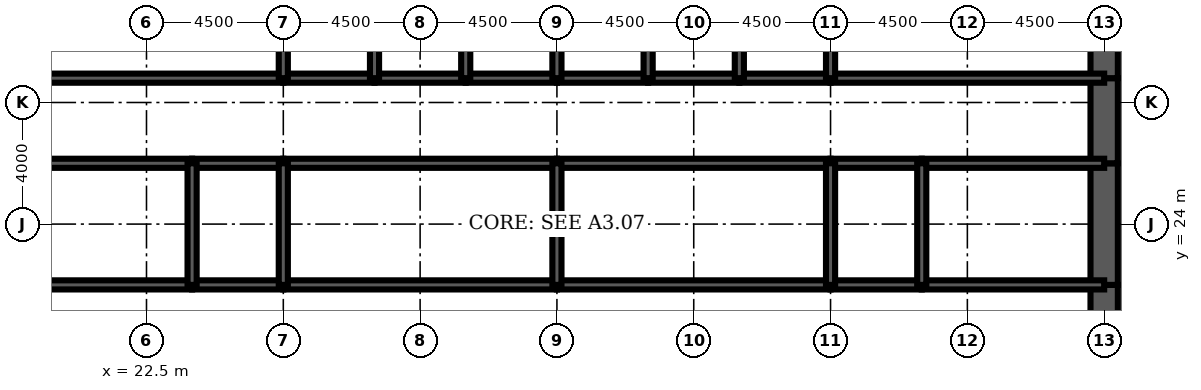
"""IFC4 building model, lengths in metres.
Left out: names, types, materials, properties, quantities, classifications, styles, units other than length and angle.
Written with IfcOpenShell. Run it as: python <this file> out.ifc"""

import sys

from ifc_helpers import new_model, si_unit, direction, frame, frame_2d, origin, place, context, subcontext, project, spatial, rectangle, extrude, element, fill, save


model = new_model("IFC4")
c1 = context("Model", 3, precision=1e-05, world=origin(), true_north=direction((0.0, 1.0)))
c2 = subcontext(c1, "Body", "Model", "MODEL_VIEW")
j1 = project(units=[si_unit("LENGTHUNIT", "METRE"), si_unit("PLANEANGLEUNIT", "RADIAN")], contexts=[c1])
p1 = place(None, origin())
s1 = spatial("IfcSite", under=j1, at=p1, CompositionType="ELEMENT")
p2 = place(p1, origin())
s2 = spatial("IfcBuilding", under=s1, at=p2, CompositionType="ELEMENT")
p3 = place(p2, frame((0.0, 0.0, 27.5)))
s3 = spatial("IfcBuildingStorey", under=s2, at=p3, CompositionType="ELEMENT", Elevation=27.5)
p4 = place(p3, frame((54.0, 19.2, 0.0), z_axis=(0.0, 0.0, 1.0), x_axis=(0.0, 1.0, 0.0)))
e1 = element("IfcWall", 1, at=p4, inside=s3, PredefinedType="SHEAR", context=c2, shape_type="SweptSolid", body=[
    extrude(rectangle(XDim=2.8, YDim=0.9, at=frame_2d((1.4, 0.0))), origin(), (0.0, 0.0, 1.0), 4.5),
])
p5 = place(p4, frame((0.4, 0.0, 0.0)))
e2 = element("IfcOpeningElement", 2, at=p5, cuts=e1, PredefinedType="OPENING", context=c2, shape_type="SweptSolid", body=[
    extrude(rectangle(XDim=1.8, YDim=2.1, at=frame_2d((0.9, 1.05))), frame((0.0, 0.46, 0.0), z_axis=(0.0, -1.0, 0.0), x_axis=(1.0, 0.0, 0.0)), (0.0, 0.0, 1.0), 0.92),
])
p6 = place(p3, frame((54.0, 22.0, 0.0), z_axis=(0.0, 0.0, 1.0), x_axis=(0.0, 1.0, 0.0)))
e3 = element("IfcWall", 3, at=p6, inside=s3, PredefinedType="SHEAR", context=c2, shape_type="SweptSolid", body=[
    extrude(rectangle(XDim=4.0, YDim=0.9, at=frame_2d((2.0, 0.0))), origin(), (0.0, 0.0, 1.0), 4.5),
])
p7 = place(p3, frame((54.0, 26.0, 0.0), z_axis=(0.0, 0.0, 1.0), x_axis=(0.0, 1.0, 0.0)))
e4 = element("IfcWall", 4, at=p7, inside=s3, PredefinedType="SHEAR", context=c2, shape_type="SweptSolid", body=[
    extrude(rectangle(XDim=2.8, YDim=0.9, at=frame_2d((1.4, 0.0))), origin(), (0.0, 0.0, 1.0), 4.5),
])
p8 = place(p7, frame((0.6, 0.0, 0.0)))
e5 = element("IfcOpeningElement", 5, at=p8, cuts=e4, PredefinedType="OPENING", context=c2, shape_type="SweptSolid", body=[
    extrude(rectangle(XDim=1.8, YDim=2.1, at=frame_2d((0.9, 1.05))), frame((0.0, 0.46, 0.0), z_axis=(0.0, -1.0, 0.0), x_axis=(1.0, 0.0, 0.0)), (0.0, 0.0, 1.0), 0.92),
])
p9 = place(p3, frame((54.0, 28.8, 0.0), z_axis=(0.0, 0.0, 1.0), x_axis=(0.0, 1.0, 0.0)))
e6 = element("IfcWall", 6, at=p9, inside=s3, PredefinedType="SHEAR", context=c2, shape_type="SweptSolid", body=[
    extrude(rectangle(XDim=3.2, YDim=0.9, at=frame_2d((1.6, 0.0))), origin(), (0.0, 0.0, 1.0), 4.5),
])
p10 = place(p3, frame((18.0, 28.8, 0.0), z_axis=(0.0, 0.0, 1.0), x_axis=(1.0, 0.0, 0.0)))
e7 = element("IfcWall", 7, at=p10, inside=s3, PredefinedType="SOLIDWALL", context=c2, shape_type="SweptSolid", body=[
    extrude(rectangle(XDim=9.0, YDim=0.3, at=frame_2d((4.5, 0.0))), origin(), (0.0, 0.0, 1.0), 4.5),
])
p11 = place(p10, frame((0.65, 0.0, 0.0)))
e8 = element("IfcOpeningElement", 8, at=p11, cuts=e7, PredefinedType="OPENING", context=c2, shape_type="SweptSolid", body=[
    extrude(rectangle(XDim=1.0, YDim=2.1, at=frame_2d((0.5, 1.05))), frame((0.0, 0.16, 0.0), z_axis=(0.0, -1.0, 0.0), x_axis=(1.0, 0.0, 0.0)), (0.0, 0.0, 1.0), 0.32),
])
p12 = place(p3, frame((27.0, 28.8, 0.0), z_axis=(0.0, 0.0, 1.0), x_axis=(1.0, 0.0, 0.0)))
e9 = element("IfcWall", 9, at=p12, inside=s3, PredefinedType="SOLIDWALL", context=c2, shape_type="SweptSolid", body=[
    extrude(rectangle(XDim=3.0, YDim=0.3, at=frame_2d((1.5, 0.0))), origin(), (0.0, 0.0, 1.0), 4.5),
])
p13 = place(p12, frame((0.95, 0.0, 0.0)))
e10 = element("IfcOpeningElement", 10, at=p13, cuts=e9, PredefinedType="OPENING", context=c2, shape_type="SweptSolid", body=[
    extrude(rectangle(XDim=1.1, YDim=2.2, at=frame_2d((0.55, 1.1))), frame((0.0, 0.16, 0.0), z_axis=(0.0, -1.0, 0.0), x_axis=(1.0, 0.0, 0.0)), (0.0, 0.0, 1.0), 0.32),
])
p14 = place(p3, frame((30.0, 28.8, 0.0), z_axis=(0.0, 0.0, 1.0), x_axis=(1.0, 0.0, 0.0)))
e11 = element("IfcWall", 11, at=p14, inside=s3, PredefinedType="SOLIDWALL", context=c2, shape_type="SweptSolid", body=[
    extrude(rectangle(XDim=3.0, YDim=0.3, at=frame_2d((1.5, 0.0))), origin(), (0.0, 0.0, 1.0), 4.5),
])
p15 = place(p14, frame((0.95, 0.0, 0.0)))
e12 = element("IfcOpeningElement", 12, at=p15, cuts=e11, PredefinedType="OPENING", context=c2, shape_type="SweptSolid", body=[
    extrude(rectangle(XDim=1.1, YDim=2.2, at=frame_2d((0.55, 1.1))), frame((0.0, 0.16, 0.0), z_axis=(0.0, -1.0, 0.0), x_axis=(1.0, 0.0, 0.0)), (0.0, 0.0, 1.0), 0.32),
])
p16 = place(p3, frame((33.0, 28.8, 0.0), z_axis=(0.0, 0.0, 1.0), x_axis=(1.0, 0.0, 0.0)))
e13 = element("IfcWall", 13, at=p16, inside=s3, PredefinedType="SOLIDWALL", context=c2, shape_type="SweptSolid", body=[
    extrude(rectangle(XDim=3.0, YDim=0.3, at=frame_2d((1.5, 0.0))), origin(), (0.0, 0.0, 1.0), 4.5),
])
p17 = place(p16, frame((0.95, 0.0, 0.0)))
e14 = element("IfcOpeningElement", 14, at=p17, cuts=e13, PredefinedType="OPENING", context=c2, shape_type="SweptSolid", body=[
    extrude(rectangle(XDim=1.1, YDim=2.2, at=frame_2d((0.55, 1.1))), frame((0.0, 0.16, 0.0), z_axis=(0.0, -1.0, 0.0), x_axis=(1.0, 0.0, 0.0)), (0.0, 0.0, 1.0), 0.32),
])
for number, where, z_axis, x_axis in (
    (15, (36.0, 28.8, 0.0), (0.0, 0.0, 1.0), (1.0, 0.0, 0.0)),
    (16, (39.0, 28.8, 0.0), (0.0, 0.0, 1.0), (1.0, 0.0, 0.0)),
):
    element("IfcWall", number, at=place(p3, frame(where, z_axis=z_axis, x_axis=x_axis)), inside=s3, PredefinedType="SOLIDWALL", context=c2, shape_type="SweptSolid", body=[
        extrude(rectangle(XDim=3.0, YDim=0.3, at=frame_2d((1.5, 0.0))), origin(), (0.0, 0.0, 1.0), 4.5),
    ])
p18 = place(p3, frame((42.0, 28.8, 0.0), z_axis=(0.0, 0.0, 1.0), x_axis=(1.0, 0.0, 0.0)))
e17 = element("IfcWall", 17, at=p18, inside=s3, PredefinedType="SOLIDWALL", context=c2, shape_type="SweptSolid", body=[
    extrude(rectangle(XDim=3.0, YDim=0.3, at=frame_2d((1.5, 0.0))), origin(), (0.0, 0.0, 1.0), 4.5),
])
p19 = place(p18, frame((0.95, 0.0, 0.0)))
e18 = element("IfcOpeningElement", 18, at=p19, cuts=e17, PredefinedType="OPENING", context=c2, shape_type="SweptSolid", body=[
    extrude(rectangle(XDim=1.1, YDim=2.2, at=frame_2d((0.55, 1.1))), frame((0.0, 0.16, 0.0), z_axis=(0.0, -1.0, 0.0), x_axis=(1.0, 0.0, 0.0)), (0.0, 0.0, 1.0), 0.32),
])
p20 = place(p3, frame((45.0, 28.8, 0.0), z_axis=(0.0, 0.0, 1.0), x_axis=(1.0, 0.0, 0.0)))
e19 = element("IfcWall", 19, at=p20, inside=s3, PredefinedType="SOLIDWALL", context=c2, shape_type="SweptSolid", body=[
    extrude(rectangle(XDim=9.0, YDim=0.3, at=frame_2d((4.5, 0.0))), origin(), (0.0, 0.0, 1.0), 4.5),
])
p21 = place(p20, frame((7.35, 0.0, 0.0)))
e20 = element("IfcOpeningElement", 20, at=p21, cuts=e19, PredefinedType="OPENING", context=c2, shape_type="SweptSolid", body=[
    extrude(rectangle(XDim=1.0, YDim=2.1, at=frame_2d((0.5, 1.05))), frame((0.0, 0.16, 0.0), z_axis=(0.0, -1.0, 0.0), x_axis=(1.0, 0.0, 0.0)), (0.0, 0.0, 1.0), 0.32),
])
p22 = place(p3, frame((18.0, 22.0, 0.0), z_axis=(0.0, 0.0, 1.0), x_axis=(1.0, 0.0, 0.0)))
e21 = element("IfcWall", 21, at=p22, inside=s3, PredefinedType="SOLIDWALL", context=c2, shape_type="SweptSolid", body=[
    extrude(rectangle(XDim=6.0, YDim=0.3, at=frame_2d((3.0, 0.0))), origin(), (0.0, 0.0, 1.0), 4.5),
])
p23 = place(p22, frame((4.4, 0.0, 0.0)))
e22 = element("IfcOpeningElement", 22, at=p23, cuts=e21, PredefinedType="OPENING", context=c2, shape_type="SweptSolid", body=[
    extrude(rectangle(XDim=1.0, YDim=2.1, at=frame_2d((0.5, 1.05))), frame((0.0, 0.16, 0.0), z_axis=(0.0, -1.0, 0.0), x_axis=(1.0, 0.0, 0.0)), (0.0, 0.0, 1.0), 0.32),
])
p24 = place(p22, frame((0.85, 0.0, 0.0)))
e23 = element("IfcOpeningElement", 23, at=p24, cuts=e21, PredefinedType="OPENING", context=c2, shape_type="SweptSolid", body=[
    extrude(rectangle(XDim=1.0, YDim=2.1, at=frame_2d((0.5, 1.05))), frame((0.0, 0.16, 0.0), z_axis=(0.0, -1.0, 0.0), x_axis=(1.0, 0.0, 0.0)), (0.0, 0.0, 1.0), 0.32),
])
p25 = place(p3, frame((24.0, 22.0, 0.0), z_axis=(0.0, 0.0, 1.0), x_axis=(1.0, 0.0, 0.0)))
e24 = element("IfcWall", 24, at=p25, inside=s3, PredefinedType="SOLIDWALL", context=c2, shape_type="SweptSolid", body=[
    extrude(rectangle(XDim=3.0, YDim=0.3, at=frame_2d((1.5, 0.0))), origin(), (0.0, 0.0, 1.0), 4.5),
])
p26 = place(p25, frame((1.0, 0.0, 0.0)))
e25 = element("IfcOpeningElement", 25, at=p26, cuts=e24, PredefinedType="OPENING", context=c2, shape_type="SweptSolid", body=[
    extrude(rectangle(XDim=1.0, YDim=2.1, at=frame_2d((0.5, 1.05))), frame((0.0, 0.16, 0.0), z_axis=(0.0, -1.0, 0.0), x_axis=(1.0, 0.0, 0.0)), (0.0, 0.0, 1.0), 0.32),
])
p27 = place(p3, frame((27.0, 22.0, 0.0), z_axis=(0.0, 0.0, 1.0), x_axis=(1.0, 0.0, 0.0)))
e26 = element("IfcWall", 26, at=p27, inside=s3, PredefinedType="SOLIDWALL", context=c2, shape_type="SweptSolid", body=[
    extrude(rectangle(XDim=9.0, YDim=0.3, at=frame_2d((4.5, 0.0))), origin(), (0.0, 0.0, 1.0), 4.5),
])
p28 = place(p27, frame((4.0, 0.0, 0.0)))
e27 = element("IfcOpeningElement", 27, at=p28, cuts=e26, PredefinedType="OPENING", context=c2, shape_type="SweptSolid", body=[
    extrude(rectangle(XDim=1.0, YDim=2.1, at=frame_2d((0.5, 1.05))), frame((0.0, 0.16, 0.0), z_axis=(0.0, -1.0, 0.0), x_axis=(1.0, 0.0, 0.0)), (0.0, 0.0, 1.0), 0.32),
])
p29 = place(p3, frame((36.0, 22.0, 0.0), z_axis=(0.0, 0.0, 1.0), x_axis=(1.0, 0.0, 0.0)))
e28 = element("IfcWall", 28, at=p29, inside=s3, PredefinedType="SOLIDWALL", context=c2, shape_type="SweptSolid", body=[
    extrude(rectangle(XDim=9.0, YDim=0.3, at=frame_2d((4.5, 0.0))), origin(), (0.0, 0.0, 1.0), 4.5),
])
p30 = place(p29, frame((4.0, 0.0, 0.0)))
e29 = element("IfcOpeningElement", 29, at=p30, cuts=e28, PredefinedType="OPENING", context=c2, shape_type="SweptSolid", body=[
    extrude(rectangle(XDim=1.0, YDim=2.1, at=frame_2d((0.5, 1.05))), frame((0.0, 0.16, 0.0), z_axis=(0.0, -1.0, 0.0), x_axis=(1.0, 0.0, 0.0)), (0.0, 0.0, 1.0), 0.32),
])
p31 = place(p3, frame((45.0, 22.0, 0.0), z_axis=(0.0, 0.0, 1.0), x_axis=(1.0, 0.0, 0.0)))
e30 = element("IfcWall", 30, at=p31, inside=s3, PredefinedType="SOLIDWALL", context=c2, shape_type="SweptSolid", body=[
    extrude(rectangle(XDim=3.0, YDim=0.3, at=frame_2d((1.5, 0.0))), origin(), (0.0, 0.0, 1.0), 4.5),
])
p32 = place(p31, frame((1.0, 0.0, 0.0)))
e31 = element("IfcOpeningElement", 31, at=p32, cuts=e30, PredefinedType="OPENING", context=c2, shape_type="SweptSolid", body=[
    extrude(rectangle(XDim=1.0, YDim=2.1, at=frame_2d((0.5, 1.05))), frame((0.0, 0.16, 0.0), z_axis=(0.0, -1.0, 0.0), x_axis=(1.0, 0.0, 0.0)), (0.0, 0.0, 1.0), 0.32),
])
p33 = place(p3, frame((48.0, 22.0, 0.0), z_axis=(0.0, 0.0, 1.0), x_axis=(1.0, 0.0, 0.0)))
e32 = element("IfcWall", 32, at=p33, inside=s3, PredefinedType="SOLIDWALL", context=c2, shape_type="SweptSolid", body=[
    extrude(rectangle(XDim=6.0, YDim=0.3, at=frame_2d((3.0, 0.0))), origin(), (0.0, 0.0, 1.0), 4.5),
])
p34 = place(p33, frame((2.0, 0.0, 0.0)))
e33 = element("IfcOpeningElement", 33, at=p34, cuts=e32, PredefinedType="OPENING", context=c2, shape_type="SweptSolid", body=[
    extrude(rectangle(XDim=1.0, YDim=2.1, at=frame_2d((0.5, 1.05))), frame((0.0, 0.16, 0.0), z_axis=(0.0, -1.0, 0.0), x_axis=(1.0, 0.0, 0.0)), (0.0, 0.0, 1.0), 0.32),
])
p35 = place(p33, frame((4.3, 0.0, 0.0)))
e34 = element("IfcOpeningElement", 34, at=p35, cuts=e32, PredefinedType="OPENING", context=c2, shape_type="SweptSolid", body=[
    extrude(rectangle(XDim=1.0, YDim=2.1, at=frame_2d((0.5, 1.05))), frame((0.0, 0.16, 0.0), z_axis=(0.0, -1.0, 0.0), x_axis=(1.0, 0.0, 0.0)), (0.0, 0.0, 1.0), 0.32),
])
p36 = place(p3, frame((18.0, 26.0, 0.0), z_axis=(0.0, 0.0, 1.0), x_axis=(1.0, 0.0, 0.0)))
e35 = element("IfcWall", 35, at=p36, inside=s3, PredefinedType="SOLIDWALL", context=c2, shape_type="SweptSolid", body=[
    extrude(rectangle(XDim=6.0, YDim=0.3, at=frame_2d((3.0, 0.0))), origin(), (0.0, 0.0, 1.0), 4.5),
])
p37 = place(p3, frame((24.0, 26.0, 0.0), z_axis=(0.0, 0.0, 1.0), x_axis=(1.0, 0.0, 0.0)))
e36 = element("IfcWall", 36, at=p37, inside=s3, PredefinedType="SOLIDWALL", context=c2, shape_type="SweptSolid", body=[
    extrude(rectangle(XDim=3.0, YDim=0.3, at=frame_2d((1.5, 0.0))), origin(), (0.0, 0.0, 1.0), 4.5),
])
for number, where, z_axis, x_axis in (
    (37, (27.0, 26.0, 0.0), (0.0, 0.0, 1.0), (1.0, 0.0, 0.0)),
    (38, (36.0, 26.0, 0.0), (0.0, 0.0, 1.0), (1.0, 0.0, 0.0)),
):
    element("IfcWall", number, at=place(p3, frame(where, z_axis=z_axis, x_axis=x_axis)), inside=s3, PredefinedType="SOLIDWALL", context=c2, shape_type="SweptSolid", body=[
        extrude(rectangle(XDim=9.0, YDim=0.3, at=frame_2d((4.5, 0.0))), origin(), (0.0, 0.0, 1.0), 4.5),
    ])
p38 = place(p3, frame((45.0, 26.0, 0.0), z_axis=(0.0, 0.0, 1.0), x_axis=(1.0, 0.0, 0.0)))
e39 = element("IfcWall", 39, at=p38, inside=s3, PredefinedType="SOLIDWALL", context=c2, shape_type="SweptSolid", body=[
    extrude(rectangle(XDim=3.0, YDim=0.3, at=frame_2d((1.5, 0.0))), origin(), (0.0, 0.0, 1.0), 4.5),
])
p39 = place(p3, frame((48.0, 26.0, 0.0), z_axis=(0.0, 0.0, 1.0), x_axis=(1.0, 0.0, 0.0)))
e40 = element("IfcWall", 40, at=p39, inside=s3, PredefinedType="SOLIDWALL", context=c2, shape_type="SweptSolid", body=[
    extrude(rectangle(XDim=6.0, YDim=0.3, at=frame_2d((3.0, 0.0))), origin(), (0.0, 0.0, 1.0), 4.5),
])
for number, where, z_axis, x_axis in (
    (41, (27.0, 28.8, 0.0), (0.0, 0.0, 1.0), (0.0, 1.0, 0.0)),
    (42, (30.0, 28.8, 0.0), (0.0, 0.0, 1.0), (0.0, 1.0, 0.0)),
    (43, (33.0, 28.8, 0.0), (0.0, 0.0, 1.0), (0.0, 1.0, 0.0)),
    (44, (36.0, 28.8, 0.0), (0.0, 0.0, 1.0), (0.0, 1.0, 0.0)),
    (45, (39.0, 28.8, 0.0), (0.0, 0.0, 1.0), (0.0, 1.0, 0.0)),
    (46, (42.0, 28.8, 0.0), (0.0, 0.0, 1.0), (0.0, 1.0, 0.0)),
    (47, (45.0, 28.8, 0.0), (0.0, 0.0, 1.0), (0.0, 1.0, 0.0)),
):
    element("IfcWall", number, at=place(p3, frame(where, z_axis=z_axis, x_axis=x_axis)), inside=s3, PredefinedType="SOLIDWALL", context=c2, shape_type="SweptSolid", body=[
        extrude(rectangle(XDim=3.2, YDim=0.3, at=frame_2d((1.6, 0.0))), origin(), (0.0, 0.0, 1.0), 4.5),
    ])
for number, where, z_axis, x_axis in (
    (48, (24.0, 22.0, 0.0), (0.0, 0.0, 1.0), (0.0, 1.0, 0.0)),
    (49, (27.0, 22.0, 0.0), (0.0, 0.0, 1.0), (0.0, 1.0, 0.0)),
    (50, (36.0, 22.0, 0.0), (0.0, 0.0, 1.0), (0.0, 1.0, 0.0)),
    (51, (45.0, 22.0, 0.0), (0.0, 0.0, 1.0), (0.0, 1.0, 0.0)),
    (52, (48.0, 22.0, 0.0), (0.0, 0.0, 1.0), (0.0, 1.0, 0.0)),
):
    element("IfcWall", number, at=place(p3, frame(where, z_axis=z_axis, x_axis=x_axis)), inside=s3, PredefinedType="SOLIDWALL", context=c2, shape_type="SweptSolid", body=[
        extrude(rectangle(XDim=4.0, YDim=0.3, at=frame_2d((2.0, 0.0))), origin(), (0.0, 0.0, 1.0), 4.5),
    ])
for number, where, z_axis, x_axis in (
    (53, (20.325, 22.15, 0.0), (0.0, 0.0, 1.0), (0.0, 1.0, 0.0)),
    (54, (51.975, 22.15, 0.0), (0.0, 0.0, 1.0), (0.0, 1.0, 0.0)),
):
    element("IfcWall", number, at=place(p3, frame(where, z_axis=z_axis, x_axis=x_axis)), inside=s3, PredefinedType="PARTITIONING", context=c2, shape_type="SweptSolid", body=[
        extrude(rectangle(XDim=3.7, YDim=0.15, at=frame_2d((1.85, 0.0))), origin(), (0.0, 0.0, 1.0), 3.0),
    ])
p40 = place(p3, frame((23.7, 26.15, 0.0), z_axis=(0.0, 0.0, 1.0), x_axis=(0.0, 1.0, 0.0)))
e55 = element("IfcWall", 55, at=p40, inside=s3, PredefinedType="PARTITIONING", context=c2, shape_type="SweptSolid", body=[
    extrude(rectangle(XDim=2.5, YDim=0.15, at=frame_2d((1.25, 0.0))), origin(), (0.0, 0.0, 1.0), 3.0),
])
p41 = place(p40, frame((0.35, 0.0, 0.0)))
e56 = element("IfcOpeningElement", 56, at=p41, cuts=e55, PredefinedType="OPENING", context=c2, shape_type="SweptSolid", body=[
    extrude(rectangle(XDim=1.0, YDim=2.1, at=frame_2d((0.5, 1.05))), frame((0.0, 0.085, 0.0), z_axis=(0.0, -1.0, 0.0), x_axis=(1.0, 0.0, 0.0)), (0.0, 0.0, 1.0), 0.17),
])
p42 = place(p41, origin())
e57 = element("IfcDoor", 57, at=p42, inside=s3, OperationType="SINGLE_SWING_LEFT", PredefinedType="DOOR", context=c2, shape_type="SweptSolid", body=[
    extrude(rectangle(XDim=1.0, YDim=2.1, at=frame_2d((0.5, 1.05))), frame((0.0, 0.025, 0.0), z_axis=(0.0, -1.0, 0.0), x_axis=(1.0, 0.0, 0.0)), (0.0, 0.0, 1.0), 0.05),
])
fill(e56, e57)
p43 = place(p19, origin())
e58 = element("IfcDoor", 58, at=p43, inside=s3, OperationType="DOUBLE_DOOR_SLIDING", PredefinedType="USERDEFINED", context=c2, shape_type="SweptSolid", body=[
    extrude(rectangle(XDim=1.1, YDim=2.2, at=frame_2d((0.55, 1.1))), frame((0.0, 0.025, 0.0), z_axis=(0.0, -1.0, 0.0), x_axis=(1.0, 0.0, 0.0)), (0.0, 0.0, 1.0), 0.05),
])
fill(e18, e58)
p44 = place(p13, origin())
e59 = element("IfcDoor", 59, at=p44, inside=s3, OperationType="DOUBLE_DOOR_SLIDING", PredefinedType="USERDEFINED", context=c2, shape_type="SweptSolid", body=[
    extrude(rectangle(XDim=1.1, YDim=2.2, at=frame_2d((0.55, 1.1))), frame((0.0, 0.025, 0.0), z_axis=(0.0, -1.0, 0.0), x_axis=(1.0, 0.0, 0.0)), (0.0, 0.0, 1.0), 0.05),
])
fill(e10, e59)
p45 = place(p15, origin())
e60 = element("IfcDoor", 60, at=p45, inside=s3, OperationType="DOUBLE_DOOR_SLIDING", PredefinedType="USERDEFINED", context=c2, shape_type="SweptSolid", body=[
    extrude(rectangle(XDim=1.1, YDim=2.2, at=frame_2d((0.55, 1.1))), frame((0.0, 0.025, 0.0), z_axis=(0.0, -1.0, 0.0), x_axis=(1.0, 0.0, 0.0)), (0.0, 0.0, 1.0), 0.05),
])
fill(e12, e60)
p46 = place(p17, origin())
e61 = element("IfcDoor", 61, at=p46, inside=s3, OperationType="DOUBLE_DOOR_SLIDING", PredefinedType="USERDEFINED", context=c2, shape_type="SweptSolid", body=[
    extrude(rectangle(XDim=1.1, YDim=2.2, at=frame_2d((0.55, 1.1))), frame((0.0, 0.025, 0.0), z_axis=(0.0, -1.0, 0.0), x_axis=(1.0, 0.0, 0.0)), (0.0, 0.0, 1.0), 0.05),
])
fill(e14, e61)
p47 = place(p11, origin())
e62 = element("IfcDoor", 62, at=p47, inside=s3, OperationType="SINGLE_SWING_LEFT", PredefinedType="DOOR", context=c2, shape_type="SweptSolid", body=[
    extrude(rectangle(XDim=1.0, YDim=2.1, at=frame_2d((0.5, 1.05))), frame((0.0, 0.025, 0.0), z_axis=(0.0, -1.0, 0.0), x_axis=(1.0, 0.0, 0.0)), (0.0, 0.0, 1.0), 0.05),
])
fill(e8, e62)
p48 = place(p21, origin())
e63 = element("IfcDoor", 63, at=p48, inside=s3, OperationType="SINGLE_SWING_RIGHT", PredefinedType="DOOR", context=c2, shape_type="SweptSolid", body=[
    extrude(rectangle(XDim=1.0, YDim=2.1, at=frame_2d((0.5, 1.05))), frame((0.0, 0.025, 0.0), z_axis=(0.0, -1.0, 0.0), x_axis=(1.0, 0.0, 0.0)), (0.0, 0.0, 1.0), 0.05),
])
fill(e20, e63)
p49 = place(p5, origin())
e64 = element("IfcDoor", 64, at=p49, inside=s3, OperationType="SINGLE_SWING_LEFT", PredefinedType="DOOR", context=c2, shape_type="SweptSolid", body=[
    extrude(rectangle(XDim=1.8, YDim=2.1, at=frame_2d((0.9, 1.05))), frame((0.0, 0.45, 0.0), z_axis=(0.0, -1.0, 0.0), x_axis=(1.0, 0.0, 0.0)), (0.0, 0.0, 1.0), 0.899),
])
fill(e2, e64)
p50 = place(p8, origin())
e65 = element("IfcDoor", 65, at=p50, inside=s3, OperationType="SINGLE_SWING_LEFT", PredefinedType="DOOR", context=c2, shape_type="SweptSolid", body=[
    extrude(rectangle(XDim=1.8, YDim=2.1, at=frame_2d((0.9, 1.05))), frame((0.0, 0.45, 0.0), z_axis=(0.0, -1.0, 0.0), x_axis=(1.0, 0.0, 0.0)), (0.0, 0.0, 1.0), 0.899),
])
fill(e5, e65)
p51 = place(p23, origin())
e66 = element("IfcDoor", 66, at=p51, inside=s3, OperationType="SINGLE_SWING_RIGHT", PredefinedType="DOOR", context=c2, shape_type="SweptSolid", body=[
    extrude(rectangle(XDim=1.0, YDim=2.1, at=frame_2d((0.5, 1.05))), frame((0.0, 0.025, 0.0), z_axis=(0.0, -1.0, 0.0), x_axis=(1.0, 0.0, 0.0)), (0.0, 0.0, 1.0), 0.05),
])
fill(e22, e66)
p52 = place(p26, origin())
e67 = element("IfcDoor", 67, at=p52, inside=s3, OperationType="SINGLE_SWING_LEFT", PredefinedType="DOOR", context=c2, shape_type="SweptSolid", body=[
    extrude(rectangle(XDim=1.0, YDim=2.1, at=frame_2d((0.5, 1.05))), frame((0.0, 0.025, 0.0), z_axis=(0.0, -1.0, 0.0), x_axis=(1.0, 0.0, 0.0)), (0.0, 0.0, 1.0), 0.05),
])
fill(e25, e67)
p53 = place(p28, origin())
e68 = element("IfcDoor", 68, at=p53, inside=s3, OperationType="SINGLE_SWING_LEFT", PredefinedType="DOOR", context=c2, shape_type="SweptSolid", body=[
    extrude(rectangle(XDim=1.0, YDim=2.1, at=frame_2d((0.5, 1.05))), frame((0.0, 0.025, 0.0), z_axis=(0.0, -1.0, 0.0), x_axis=(1.0, 0.0, 0.0)), (0.0, 0.0, 1.0), 0.05),
])
fill(e27, e68)
p54 = place(p30, origin())
e69 = element("IfcDoor", 69, at=p54, inside=s3, OperationType="SINGLE_SWING_LEFT", PredefinedType="DOOR", context=c2, shape_type="SweptSolid", body=[
    extrude(rectangle(XDim=1.0, YDim=2.1, at=frame_2d((0.5, 1.05))), frame((0.0, 0.025, 0.0), z_axis=(0.0, -1.0, 0.0), x_axis=(1.0, 0.0, 0.0)), (0.0, 0.0, 1.0), 0.05),
])
fill(e29, e69)
p55 = place(p32, origin())
e70 = element("IfcDoor", 70, at=p55, inside=s3, OperationType="SINGLE_SWING_LEFT", PredefinedType="DOOR", context=c2, shape_type="SweptSolid", body=[
    extrude(rectangle(XDim=1.0, YDim=2.1, at=frame_2d((0.5, 1.05))), frame((0.0, 0.025, 0.0), z_axis=(0.0, -1.0, 0.0), x_axis=(1.0, 0.0, 0.0)), (0.0, 0.0, 1.0), 0.05),
])
fill(e31, e70)
p56 = place(p34, origin())
e71 = element("IfcDoor", 71, at=p56, inside=s3, OperationType="SINGLE_SWING_LEFT", PredefinedType="DOOR", context=c2, shape_type="SweptSolid", body=[
    extrude(rectangle(XDim=1.0, YDim=2.1, at=frame_2d((0.5, 1.05))), frame((0.0, 0.025, 0.0), z_axis=(0.0, -1.0, 0.0), x_axis=(1.0, 0.0, 0.0)), (0.0, 0.0, 1.0), 0.05),
])
fill(e33, e71)
p57 = place(p24, origin())
e72 = element("IfcDoor", 72, at=p57, inside=s3, OperationType="SINGLE_SWING_LEFT", PredefinedType="DOOR", context=c2, shape_type="SweptSolid", body=[
    extrude(rectangle(XDim=1.0, YDim=2.1, at=frame_2d((0.5, 1.05))), frame((0.0, 0.025, 0.0), z_axis=(0.0, -1.0, 0.0), x_axis=(1.0, 0.0, 0.0)), (0.0, 0.0, 1.0), 0.05),
])
fill(e23, e72)
p58 = place(p35, origin())
e73 = element("IfcDoor", 73, at=p58, inside=s3, OperationType="SINGLE_SWING_RIGHT", PredefinedType="DOOR", context=c2, shape_type="SweptSolid", body=[
    extrude(rectangle(XDim=1.0, YDim=2.1, at=frame_2d((0.5, 1.05))), frame((0.0, 0.025, 0.0), z_axis=(0.0, -1.0, 0.0), x_axis=(1.0, 0.0, 0.0)), (0.0, 0.0, 1.0), 0.05),
])
fill(e34, e73)
save(model, sys.argv[1])
